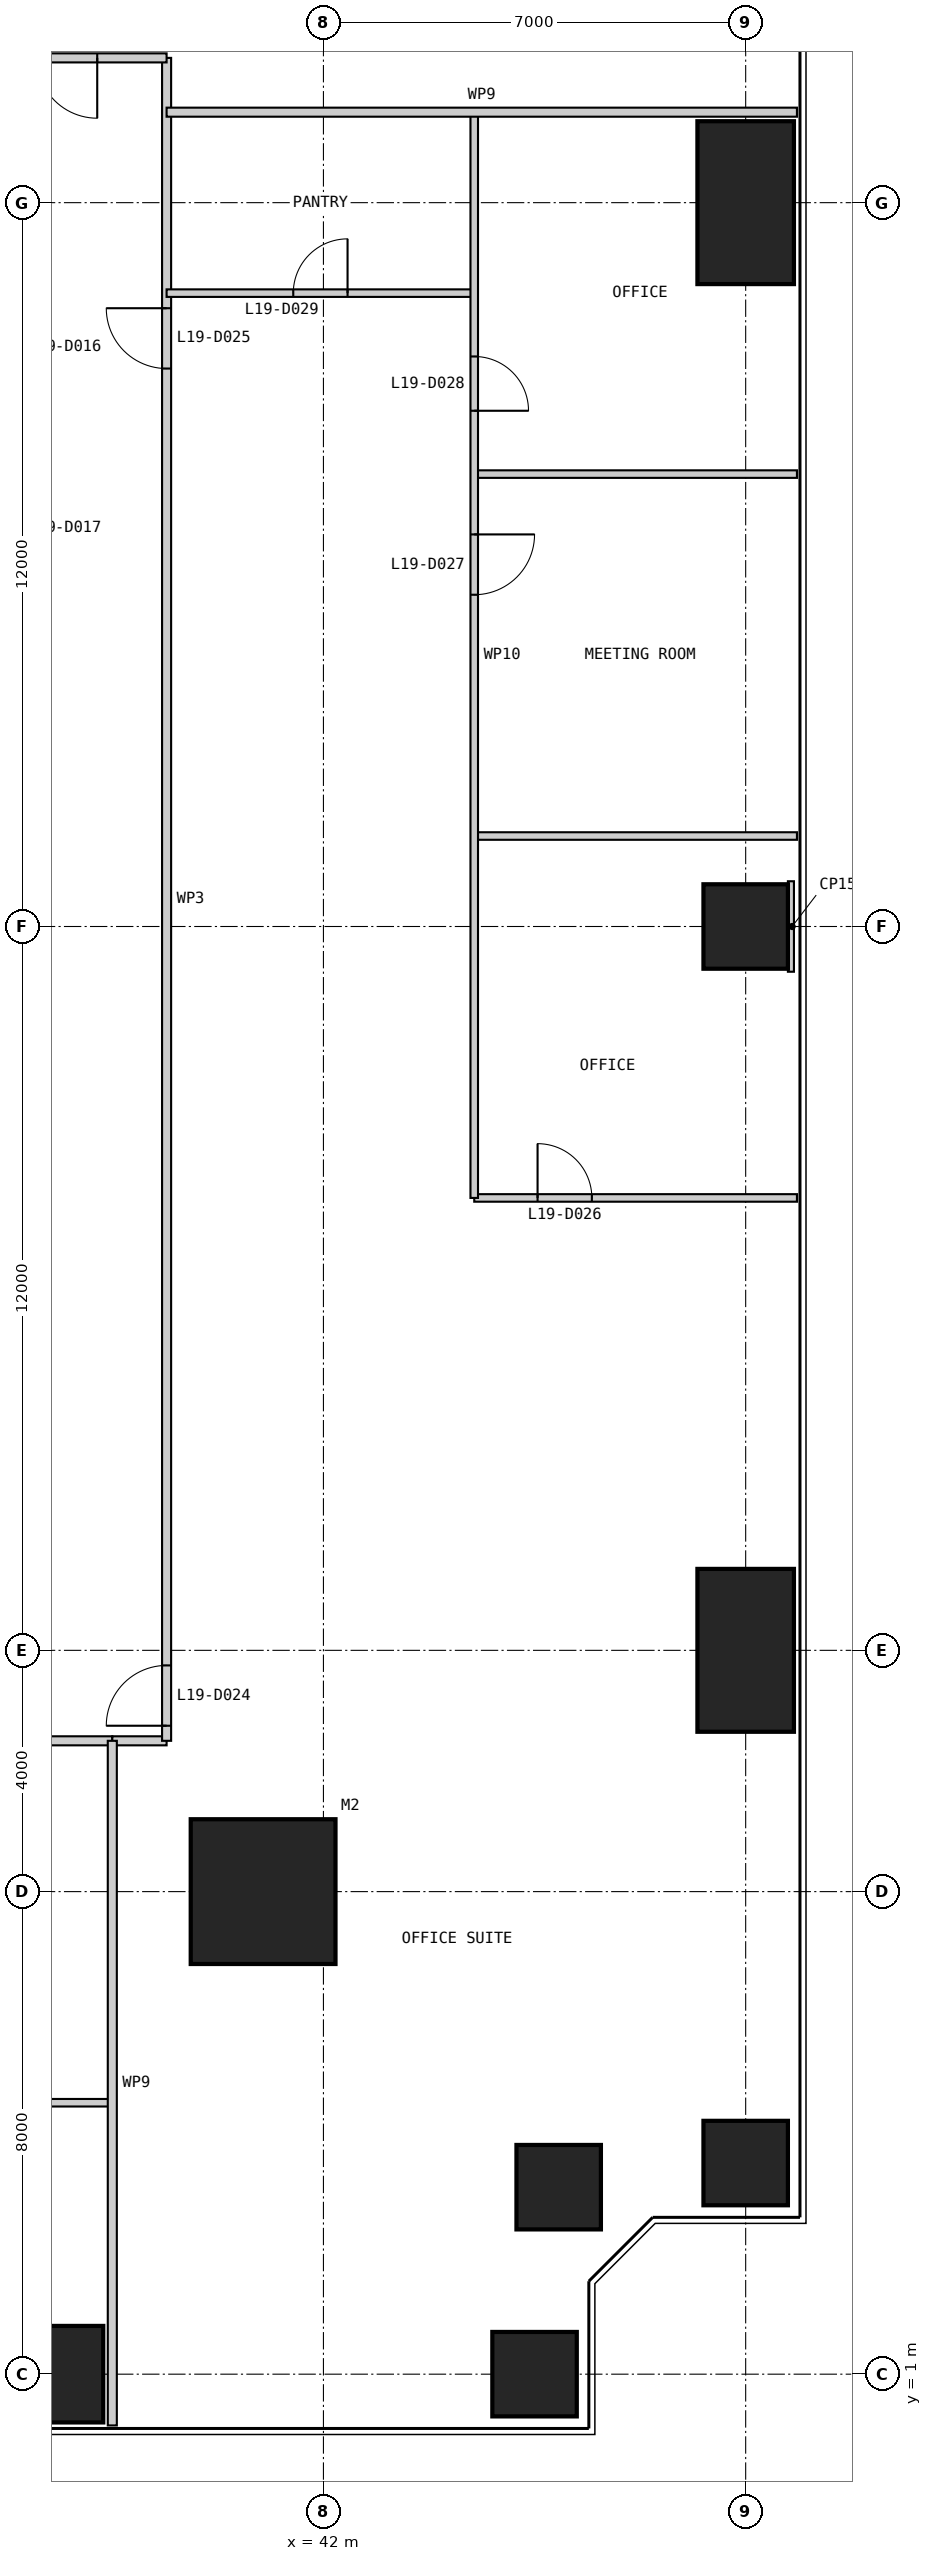
"""IFC4 building model, lengths in metres.
Left out: names, types, materials, properties, quantities, classifications, styles, units other than length and angle.
Written with IfcOpenShell. Run it as: python <this file> out.ifc"""

import sys

from ifc_helpers import new_model, si_unit, direction, frame, frame_2d, origin, origin_2d, place, context, subcontext, project, spatial, rectangle, extrude, element, fill, save


model = new_model("IFC4")
c1 = context("Model", 3, precision=1e-05, world=origin(), true_north=direction((0.0, 1.0)))
c2 = subcontext(c1, "Body", "Model", "MODEL_VIEW")
j1 = project(units=[si_unit("LENGTHUNIT", "METRE"), si_unit("PLANEANGLEUNIT", "RADIAN")], contexts=[c1])
p1 = place(None, origin())
s1 = spatial("IfcSite", under=j1, at=p1, CompositionType="ELEMENT")
p2 = place(p1, origin())
s2 = spatial("IfcBuilding", under=s1, at=p2, CompositionType="ELEMENT")
p3 = place(p2, frame((0.0, 0.0, 83.0)))
s3 = spatial("IfcBuildingStorey", under=s2, at=p3, CompositionType="ELEMENT", Elevation=83.0)
p4 = place(p3, frame((41.0, 9.0, 0.0), z_axis=(0.0, 0.0, 1.0), x_axis=(1.0, 0.0, 0.0)))
e1 = element("IfcColumn", 1, at=p4, inside=s3, PredefinedType="COLUMN", context=c2, shape_type="SweptSolid", body=[
    extrude(rectangle(XDim=2.4, YDim=2.4, at=origin_2d()), origin(), (0.0, 0.0, 1.0), 4.0),
])
p5 = place(p3, frame((37.0, 1.0, 0.0), z_axis=(0.0, 0.0, 1.0), x_axis=(1.0, 0.0, 0.0)))
e2 = element("IfcColumn", 2, at=p5, inside=s3, PredefinedType="COLUMN", context=c2, shape_type="SweptSolid", body=[
    extrude(rectangle(XDim=2.7, YDim=1.6, at=origin_2d()), origin(), (0.0, 0.0, 1.0), 4.0),
])
for number, where, z_axis, x_axis in (
    (3, (45.5, 1.0, 0.0), (0.0, 0.0, 1.0), (1.0, 0.0, 0.0)),
    (4, (45.9, 4.1, 0.0), (0.0, 0.0, 1.0), (1.0, 0.0, 0.0)),
    (5, (49.0, 4.5, 0.0), (0.0, 0.0, 1.0), (1.0, 0.0, 0.0)),
):
    element("IfcColumn", number, at=place(p3, frame(where, z_axis=z_axis, x_axis=x_axis)), inside=s3, PredefinedType="COLUMN", context=c2, shape_type="SweptSolid", body=[
        extrude(rectangle(XDim=1.4, YDim=1.4, at=origin_2d()), origin(), (0.0, 0.0, 1.0), 4.0),
    ])
p6 = place(p3, frame((49.0, 13.0, 0.0), z_axis=(0.0, 0.0, 1.0), x_axis=(1.0, 0.0, 0.0)))
e6 = element("IfcColumn", 6, at=p6, inside=s3, PredefinedType="COLUMN", context=c2, shape_type="SweptSolid", body=[
    extrude(rectangle(XDim=1.6, YDim=2.7, at=origin_2d()), origin(), (0.0, 0.0, 1.0), 4.0),
])
p7 = place(p3, frame((49.0, 25.0, 0.0), z_axis=(0.0, 0.0, 1.0), x_axis=(1.0, 0.0, 0.0)))
e7 = element("IfcColumn", 7, at=p7, inside=s3, PredefinedType="COLUMN", context=c2, shape_type="SweptSolid", body=[
    extrude(rectangle(XDim=1.4, YDim=1.4, at=origin_2d()), origin(), (0.0, 0.0, 1.0), 4.0),
])
p8 = place(p3, frame((49.0, 37.0, 0.0), z_axis=(0.0, 0.0, 1.0), x_axis=(1.0, 0.0, 0.0)))
e8 = element("IfcColumn", 8, at=p8, inside=s3, PredefinedType="COLUMN", context=c2, shape_type="SweptSolid", body=[
    extrude(rectangle(XDim=1.6, YDim=2.7, at=origin_2d()), origin(), (0.0, 0.0, 1.0), 4.0),
])
p9 = place(p3, frame((11.5, 11.5, 0.0), z_axis=(0.0, 0.0, 1.0), x_axis=(1.0, 0.0, 0.0)))
e9 = element("IfcWall", 9, at=p9, inside=s3, PredefinedType="PARTITIONING", context=c2, shape_type="SweptSolid", body=[
    extrude(rectangle(XDim=27.0, YDim=0.15, at=frame_2d((13.5, 0.0))), origin(), (0.0, 0.0, 1.0), 3.85),
])
p10 = place(p9, frame((11.5, 0.0, 0.0)))
e10 = element("IfcOpeningElement", 10, at=p10, cuts=e9, PredefinedType="OPENING", context=c2, shape_type="SweptSolid", body=[
    extrude(rectangle(XDim=1.0, YDim=2.2, at=frame_2d((0.5, 1.1))), frame((0.0, 0.085, 0.0), z_axis=(0.0, -1.0, 0.0), x_axis=(1.0, 0.0, 0.0)), (0.0, 0.0, 1.0), 0.17),
])
p11 = place(p3, frame((14.5, 5.5, 0.0), z_axis=(0.0, 0.0, 1.0), x_axis=(1.0, 0.0, 0.0)))
e11 = element("IfcWall", 11, at=p11, inside=s3, PredefinedType="PARTITIONING", context=c2, shape_type="SweptSolid", body=[
    extrude(rectangle(XDim=24.0, YDim=0.125, at=frame_2d((12.0, 0.0))), origin(), (0.0, 0.0, 1.0), 3.85),
])
p12 = place(p11, frame((10.05, 0.0, 0.0)))
e12 = element("IfcOpeningElement", 12, at=p12, cuts=e11, PredefinedType="OPENING", context=c2, shape_type="SweptSolid", body=[
    extrude(rectangle(XDim=0.9, YDim=2.2, at=frame_2d((0.45, 1.1))), frame((0.0, 0.073, 0.0), z_axis=(0.0, -1.0, 0.0), x_axis=(1.0, 0.0, 0.0)), (0.0, 0.0, 1.0), 0.145),
])
p13 = place(p11, frame((16.05, 0.0, 0.0)))
e13 = element("IfcOpeningElement", 13, at=p13, cuts=e11, PredefinedType="OPENING", context=c2, shape_type="SweptSolid", body=[
    extrude(rectangle(XDim=0.9, YDim=2.2, at=frame_2d((0.45, 1.1))), frame((0.0, 0.073, 0.0), z_axis=(0.0, -1.0, 0.0), x_axis=(1.0, 0.0, 0.0)), (0.0, 0.0, 1.0), 0.145),
])
p14 = place(p11, frame((19.05, 0.0, 0.0)))
e14 = element("IfcOpeningElement", 14, at=p14, cuts=e11, PredefinedType="OPENING", context=c2, shape_type="SweptSolid", body=[
    extrude(rectangle(XDim=0.9, YDim=2.2, at=frame_2d((0.45, 1.1))), frame((0.0, 0.073, 0.0), z_axis=(0.0, -1.0, 0.0), x_axis=(1.0, 0.0, 0.0)), (0.0, 0.0, 1.0), 0.145),
])
p15 = place(p3, frame((38.5, 11.5, 0.0), z_axis=(0.0, 0.0, 1.0), x_axis=(1.0, 0.0, 0.0)))
e15 = element("IfcWall", 15, at=p15, inside=s3, PredefinedType="PARTITIONING", context=c2, shape_type="SweptSolid", body=[
    extrude(rectangle(XDim=0.9, YDim=0.15, at=frame_2d((0.45, 0.0))), origin(), (0.0, 0.0, 1.0), 3.85),
])
p16 = place(p3, frame((39.4, 11.5, 0.0), z_axis=(0.0, 0.0, 1.0), x_axis=(0.0, 1.0, 0.0)))
e16 = element("IfcWall", 16, at=p16, inside=s3, PredefinedType="PARTITIONING", context=c2, shape_type="SweptSolid", body=[
    extrude(rectangle(XDim=27.9, YDim=0.15, at=frame_2d((13.95, 0.0))), origin(), (0.0, 0.0, 1.0), 3.85),
])
p17 = place(p16, frame((0.25, 0.0, 0.0)))
e17 = element("IfcOpeningElement", 17, at=p17, cuts=e16, PredefinedType="OPENING", context=c2, shape_type="SweptSolid", body=[
    extrude(rectangle(XDim=1.0, YDim=2.2, at=frame_2d((0.5, 1.1))), frame((0.0, 0.085, 0.0), z_axis=(0.0, -1.0, 0.0), x_axis=(1.0, 0.0, 0.0)), (0.0, 0.0, 1.0), 0.17),
])
p18 = place(p16, frame((22.75, 0.0, 0.0)))
e18 = element("IfcOpeningElement", 18, at=p18, cuts=e16, PredefinedType="OPENING", context=c2, shape_type="SweptSolid", body=[
    extrude(rectangle(XDim=1.0, YDim=2.2, at=frame_2d((0.5, 1.1))), frame((0.0, 0.085, 0.0), z_axis=(0.0, -1.0, 0.0), x_axis=(1.0, 0.0, 0.0)), (0.0, 0.0, 1.0), 0.17),
])
p19 = place(p3, frame((38.5, 0.15, 0.0), z_axis=(0.0, 0.0, 1.0), x_axis=(0.0, 1.0, 0.0)))
e19 = element("IfcWall", 19, at=p19, inside=s3, PredefinedType="PARTITIONING", context=c2, shape_type="SweptSolid", body=[
    extrude(rectangle(XDim=11.35, YDim=0.15, at=frame_2d((5.675, 0.0))), origin(), (0.0, 0.0, 1.0), 3.85),
])
p20 = place(p3, frame((49.85, 20.5, 0.0), z_axis=(0.0, 0.0, 1.0), x_axis=(-1.0, 0.0, 0.0)))
e20 = element("IfcWall", 20, at=p20, inside=s3, PredefinedType="PARTITIONING", context=c2, shape_type="SweptSolid", body=[
    extrude(rectangle(XDim=5.35, YDim=0.125, at=frame_2d((2.675, 0.0))), origin(), (0.0, 0.0, 1.0), 3.85),
])
p21 = place(p20, frame((3.4, 0.0, 0.0)))
e21 = element("IfcOpeningElement", 21, at=p21, cuts=e20, PredefinedType="OPENING", context=c2, shape_type="SweptSolid", body=[
    extrude(rectangle(XDim=0.9, YDim=2.2, at=frame_2d((0.45, 1.1))), frame((0.0, 0.073, 0.0), z_axis=(0.0, -1.0, 0.0), x_axis=(1.0, 0.0, 0.0)), (0.0, 0.0, 1.0), 0.145),
])
for number, where, z_axis, x_axis in (
    (22, (49.85, 26.5, 0.0), (0.0, 0.0, 1.0), (-1.0, 0.0, 0.0)),
    (23, (49.85, 32.5, 0.0), (0.0, 0.0, 1.0), (-1.0, 0.0, 0.0)),
):
    element("IfcWall", number, at=place(p3, frame(where, z_axis=z_axis, x_axis=x_axis)), inside=s3, PredefinedType="PARTITIONING", context=c2, shape_type="SweptSolid", body=[
        extrude(rectangle(XDim=5.35, YDim=0.125, at=frame_2d((2.675, 0.0))), origin(), (0.0, 0.0, 1.0), 3.85),
    ])
p22 = place(p3, frame((44.5, 35.5, 0.0), z_axis=(0.0, 0.0, 1.0), x_axis=(-1.0, 0.0, 0.0)))
e24 = element("IfcWall", 24, at=p22, inside=s3, PredefinedType="PARTITIONING", context=c2, shape_type="SweptSolid", body=[
    extrude(rectangle(XDim=5.1, YDim=0.125, at=frame_2d((2.55, 0.0))), origin(), (0.0, 0.0, 1.0), 3.85),
])
p23 = place(p22, frame((2.1, 0.0, 0.0)))
e25 = element("IfcOpeningElement", 25, at=p23, cuts=e24, PredefinedType="OPENING", context=c2, shape_type="SweptSolid", body=[
    extrude(rectangle(XDim=0.9, YDim=2.2, at=frame_2d((0.45, 1.1))), frame((0.0, 0.073, 0.0), z_axis=(0.0, -1.0, 0.0), x_axis=(1.0, 0.0, 0.0)), (0.0, 0.0, 1.0), 0.145),
])
p24 = place(p3, frame((44.5, 20.5, 0.0), z_axis=(0.0, 0.0, 1.0), x_axis=(0.0, 1.0, 0.0)))
e26 = element("IfcWall", 26, at=p24, inside=s3, PredefinedType="PARTITIONING", context=c2, shape_type="SweptSolid", body=[
    extrude(rectangle(XDim=18.0, YDim=0.125, at=frame_2d((9.0, 0.0))), origin(), (0.0, 0.0, 1.0), 3.85),
])
p25 = place(p24, frame((10.0, 0.0, 0.0)))
e27 = element("IfcOpeningElement", 27, at=p25, cuts=e26, PredefinedType="OPENING", context=c2, shape_type="SweptSolid", body=[
    extrude(rectangle(XDim=1.0, YDim=2.2, at=frame_2d((0.5, 1.1))), frame((0.0, 0.073, 0.0), z_axis=(0.0, -1.0, 0.0), x_axis=(1.0, 0.0, 0.0)), (0.0, 0.0, 1.0), 0.145),
])
p26 = place(p24, frame((13.05, 0.0, 0.0)))
e28 = element("IfcOpeningElement", 28, at=p26, cuts=e26, PredefinedType="OPENING", context=c2, shape_type="SweptSolid", body=[
    extrude(rectangle(XDim=0.9, YDim=2.2, at=frame_2d((0.45, 1.1))), frame((0.0, 0.073, 0.0), z_axis=(0.0, -1.0, 0.0), x_axis=(1.0, 0.0, 0.0)), (0.0, 0.0, 1.0), 0.145),
])
p27 = place(p3, frame((39.4, 39.4, 0.0), z_axis=(0.0, 0.0, 1.0), x_axis=(-1.0, 0.0, 0.0)))
e29 = element("IfcWall", 29, at=p27, inside=s3, PredefinedType="PARTITIONING", context=c2, shape_type="SweptSolid", body=[
    extrude(rectangle(XDim=28.8, YDim=0.15, at=frame_2d((14.4, 0.0))), origin(), (0.0, 0.0, 1.0), 3.85),
])
p28 = place(p27, frame((1.15, 0.0, 0.0)))
e30 = element("IfcOpeningElement", 30, at=p28, cuts=e29, PredefinedType="OPENING", context=c2, shape_type="SweptSolid", body=[
    extrude(rectangle(XDim=1.0, YDim=2.2, at=frame_2d((0.5, 1.1))), frame((0.0, 0.085, 0.0), z_axis=(0.0, -1.0, 0.0), x_axis=(1.0, 0.0, 0.0)), (0.0, 0.0, 1.0), 0.17),
])
p29 = place(p27, frame((23.65, 0.0, 0.0)))
e31 = element("IfcOpeningElement", 31, at=p29, cuts=e29, PredefinedType="OPENING", context=c2, shape_type="SweptSolid", body=[
    extrude(rectangle(XDim=1.0, YDim=2.2, at=frame_2d((0.5, 1.1))), frame((0.0, 0.085, 0.0), z_axis=(0.0, -1.0, 0.0), x_axis=(1.0, 0.0, 0.0)), (0.0, 0.0, 1.0), 0.17),
])
p30 = place(p3, frame((49.85, 38.5, 0.0), z_axis=(0.0, 0.0, 1.0), x_axis=(-1.0, 0.0, 0.0)))
e32 = element("IfcWall", 32, at=p30, inside=s3, PredefinedType="PARTITIONING", context=c2, shape_type="SweptSolid", body=[
    extrude(rectangle(XDim=10.45, YDim=0.15, at=frame_2d((5.225, 0.0))), origin(), (0.0, 0.0, 1.0), 3.85),
])
p31 = place(p3, frame((49.8, 25.0, 0.0), z_axis=(0.0, 0.0, 1.0), x_axis=(-1.0, 0.0, 0.0)))
e33 = element("IfcWall", 33, at=p31, inside=s3, PredefinedType="PARTITIONING", context=c2, shape_type="SweptSolid", body=[
    extrude(rectangle(XDim=0.1, YDim=1.5, at=frame_2d((0.05, 0.0))), origin(), (0.0, 0.0, 1.0), 3.85),
])
p32 = place(p17, origin())
e34 = element("IfcDoor", 34, at=p32, inside=s3, OperationType="SINGLE_SWING_LEFT", PredefinedType="DOOR", context=c2, shape_type="SweptSolid", body=[
    extrude(rectangle(XDim=1.0, YDim=2.2, at=frame_2d((0.5, 1.1))), frame((0.0, 0.025, 0.0), z_axis=(0.0, -1.0, 0.0), x_axis=(1.0, 0.0, 0.0)), (0.0, 0.0, 1.0), 0.05),
])
fill(e17, e34)
p33 = place(p18, origin())
e35 = element("IfcDoor", 35, at=p33, inside=s3, OperationType="SINGLE_SWING_RIGHT", PredefinedType="DOOR", context=c2, shape_type="SweptSolid", body=[
    extrude(rectangle(XDim=1.0, YDim=2.2, at=frame_2d((0.5, 1.1))), frame((0.0, 0.025, 0.0), z_axis=(0.0, -1.0, 0.0), x_axis=(1.0, 0.0, 0.0)), (0.0, 0.0, 1.0), 0.05),
])
fill(e18, e35)
p34 = place(p21, frame((0.9, 0.0, 0.0), z_axis=(0.0, 0.0, 1.0), x_axis=(-1.0, 0.0, 0.0)))
e36 = element("IfcDoor", 36, at=p34, inside=s3, OperationType="SINGLE_SWING_LEFT", PredefinedType="DOOR", context=c2, shape_type="SweptSolid", body=[
    extrude(rectangle(XDim=0.9, YDim=2.2, at=frame_2d((0.45, 1.1))), frame((0.0, 0.025, 0.0), z_axis=(0.0, -1.0, 0.0), x_axis=(1.0, 0.0, 0.0)), (0.0, 0.0, 1.0), 0.05),
])
fill(e21, e36)
p35 = place(p25, frame((1.0, 0.0, 0.0), z_axis=(0.0, 0.0, 1.0), x_axis=(-1.0, 0.0, 0.0)))
e37 = element("IfcDoor", 37, at=p35, inside=s3, OperationType="SINGLE_SWING_LEFT", PredefinedType="DOOR", context=c2, shape_type="SweptSolid", body=[
    extrude(rectangle(XDim=1.0, YDim=2.2, at=frame_2d((0.5, 1.1))), frame((0.0, 0.025, 0.0), z_axis=(0.0, -1.0, 0.0), x_axis=(1.0, 0.0, 0.0)), (0.0, 0.0, 1.0), 0.05),
])
fill(e27, e37)
p36 = place(p26, frame((0.9, 0.0, 0.0), z_axis=(0.0, 0.0, 1.0), x_axis=(-1.0, 0.0, 0.0)))
e38 = element("IfcDoor", 38, at=p36, inside=s3, OperationType="SINGLE_SWING_RIGHT", PredefinedType="DOOR", context=c2, shape_type="SweptSolid", body=[
    extrude(rectangle(XDim=0.9, YDim=2.2, at=frame_2d((0.45, 1.1))), frame((0.0, 0.025, 0.0), z_axis=(0.0, -1.0, 0.0), x_axis=(1.0, 0.0, 0.0)), (0.0, 0.0, 1.0), 0.05),
])
fill(e28, e38)
p37 = place(p23, frame((0.9, 0.0, 0.0), z_axis=(0.0, 0.0, 1.0), x_axis=(-1.0, 0.0, 0.0)))
e39 = element("IfcDoor", 39, at=p37, inside=s3, OperationType="SINGLE_SWING_RIGHT", PredefinedType="DOOR", context=c2, shape_type="SweptSolid", body=[
    extrude(rectangle(XDim=0.9, YDim=2.2, at=frame_2d((0.45, 1.1))), frame((0.0, 0.025, 0.0), z_axis=(0.0, -1.0, 0.0), x_axis=(1.0, 0.0, 0.0)), (0.0, 0.0, 1.0), 0.05),
])
fill(e25, e39)
p38 = place(p28, origin())
e40 = element("IfcDoor", 40, at=p38, inside=s3, OperationType="SINGLE_SWING_LEFT", PredefinedType="DOOR", context=c2, shape_type="SweptSolid", body=[
    extrude(rectangle(XDim=1.0, YDim=2.2, at=frame_2d((0.5, 1.1))), frame((0.0, 0.025, 0.0), z_axis=(0.0, -1.0, 0.0), x_axis=(1.0, 0.0, 0.0)), (0.0, 0.0, 1.0), 0.05),
])
fill(e30, e40)
save(model, sys.argv[1])
